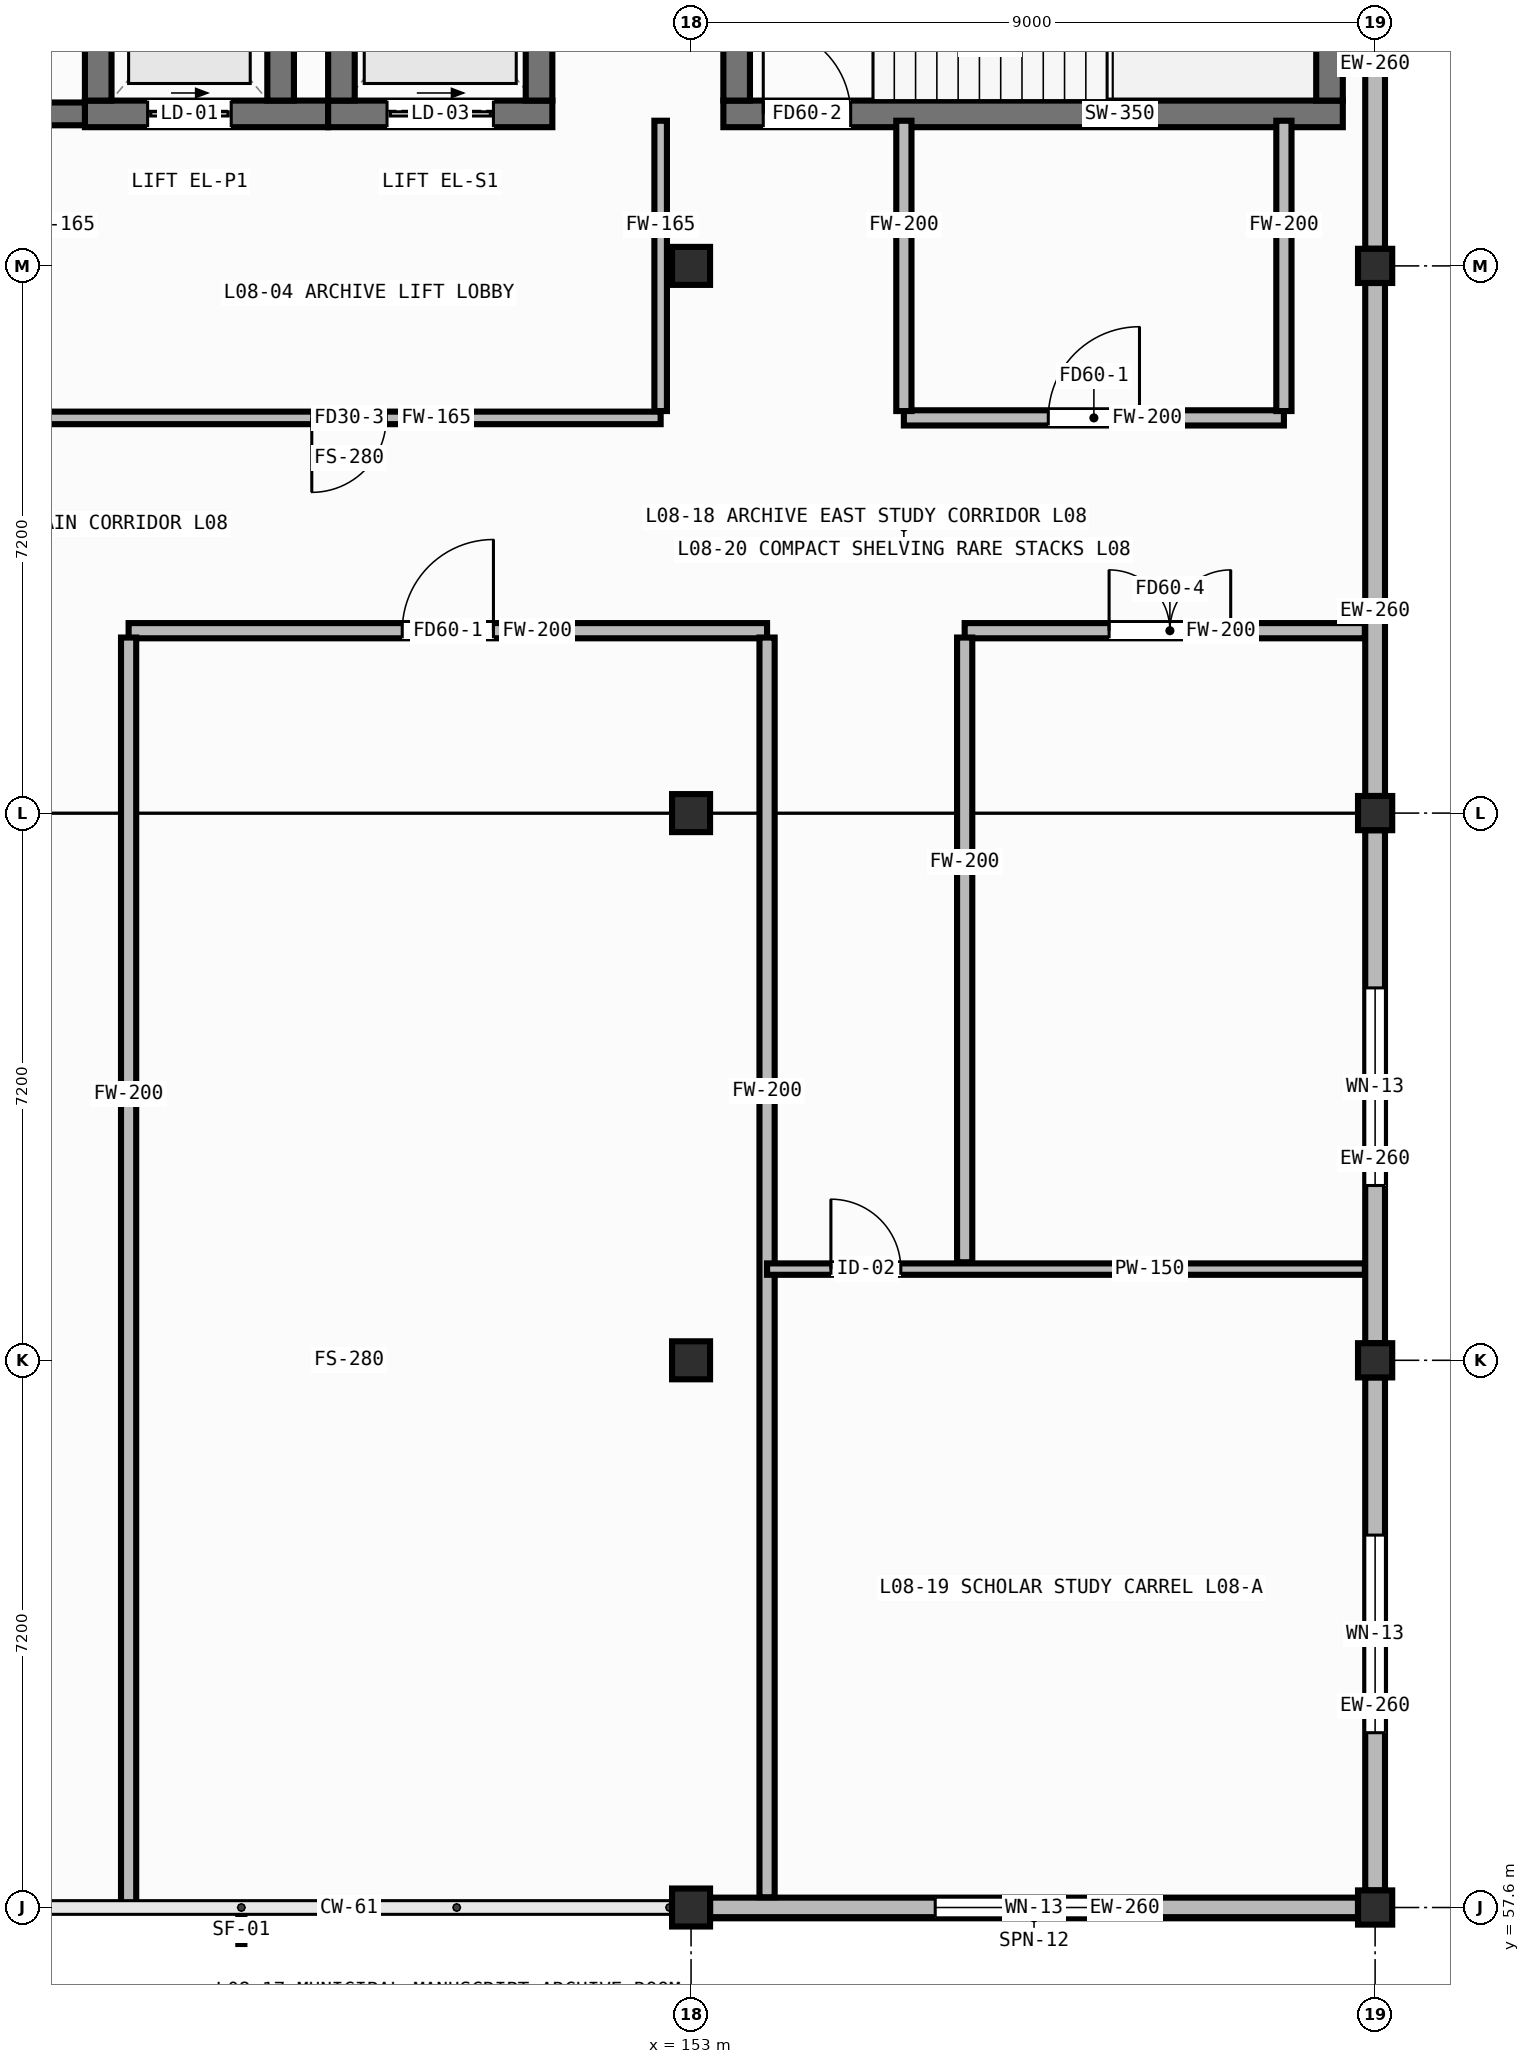
"""IFC4 building model, lengths in metres.
Left out: names, types, materials, properties, quantities, classifications, styles, units other than length and angle.
Written with IfcOpenShell. Run it as: python <this file> out.ifc"""

import sys

from ifc_helpers import new_model, si_unit, direction, frame, frame_2d, origin, origin_2d, place, context, subcontext, project, spatial, rectangle, hollow_rectangle, extrude, element, fill, save


model = new_model("IFC4")
c1 = context("Model", 3, precision=1e-05, world=origin(), true_north=direction((0.0, 1.0)))
c2 = subcontext(c1, "Body", "Model", "MODEL_VIEW")
j1 = project(units=[si_unit("LENGTHUNIT", "METRE"), si_unit("PLANEANGLEUNIT", "RADIAN")], contexts=[c1])
p1 = place(None, origin())
s1 = spatial("IfcSite", under=j1, at=p1, CompositionType="ELEMENT")
p2 = place(p1, origin())
s2 = spatial("IfcBuilding", under=s1, at=p2, CompositionType="ELEMENT")
p3 = place(p2, frame((0.0, 0.0, 27.8)))
s3 = spatial("IfcBuildingStorey", under=s2, at=p3, CompositionType="ELEMENT", Elevation=27.8)
for number, where, z_axis, x_axis in (
    (1, (153.0, 57.6, 0.0), (0.0, 0.0, 1.0), (1.0, 0.0, 0.0)),
    (2, (153.0, 64.8, 0.0), (0.0, 0.0, 1.0), (1.0, 0.0, 0.0)),
    (3, (153.0, 72.0, 0.0), (0.0, 0.0, 1.0), (1.0, 0.0, 0.0)),
    (4, (153.0, 79.2, 0.0), (0.0, 0.0, 1.0), (1.0, 0.0, 0.0)),
):
    element("IfcColumn", number, at=place(p3, frame(where, z_axis=z_axis, x_axis=x_axis)), inside=s3, PredefinedType="COLUMN", context=c2, shape_type="SweptSolid", body=[
        extrude(hollow_rectangle(XDim=0.5, YDim=0.5, WallThickness=0.022, at=origin_2d()), origin(), (0.0, 0.0, 1.0), 3.6),
    ])
for number, where, z_axis, x_axis in (
    (5, (162.0, 57.6, 0.0), (0.0, 0.0, 1.0), (1.0, 0.0, 0.0)),
    (6, (162.0, 64.8, 0.0), (0.0, 0.0, 1.0), (1.0, 0.0, 0.0)),
    (7, (162.0, 72.0, 0.0), (0.0, 0.0, 1.0), (1.0, 0.0, 0.0)),
    (8, (162.0, 79.2, 0.0), (0.0, 0.0, 1.0), (1.0, 0.0, 0.0)),
):
    element("IfcColumn", number, at=place(p3, frame(where, z_axis=z_axis, x_axis=x_axis)), inside=s3, PredefinedType="COLUMN", context=c2, shape_type="SweptSolid", body=[
        extrude(hollow_rectangle(XDim=0.45, YDim=0.45, WallThickness=0.019, at=origin_2d()), origin(), (0.0, 0.0, 1.0), 3.6),
    ])
p4 = place(p3, frame((153.25, 57.6, 0.0), z_axis=(0.0, 0.0, 1.0), x_axis=(1.0, 0.0, 0.0)))
e9 = element("IfcWall", 9, at=p4, inside=s3, PredefinedType="STANDARD", context=c2, shape_type="SweptSolid", body=[
    extrude(rectangle(XDim=8.525, YDim=0.26, at=frame_2d((4.262, 0.0))), origin(), (0.0, 0.0, 1.0), 2.915),
])
p5 = place(p4, frame((2.962, 0.0, 0.85)))
e10 = element("IfcOpeningElement", 10, at=p5, cuts=e9, PredefinedType="OPENING", context=c2, shape_type="SweptSolid", body=[
    extrude(rectangle(XDim=2.6, YDim=1.6, at=frame_2d((1.3, 0.8))), frame((0.0, 0.142, 0.0), z_axis=(0.0, -1.0, 0.0), x_axis=(1.0, 0.0, 0.0)), (0.0, 0.0, 1.0), 0.284),
])
p6 = place(p3, frame((162.0, 64.575, 0.0), z_axis=(0.0, 0.0, 1.0), x_axis=(0.0, -1.0, 0.0)))
e11 = element("IfcWall", 11, at=p6, inside=s3, PredefinedType="STANDARD", context=c2, shape_type="SweptSolid", body=[
    extrude(rectangle(XDim=6.75, YDim=0.26, at=frame_2d((3.375, 0.0))), origin(), (0.0, 0.0, 1.0), 2.915),
])
p7 = place(p6, frame((2.075, 0.0, 0.85)))
e12 = element("IfcOpeningElement", 12, at=p7, cuts=e11, PredefinedType="OPENING", context=c2, shape_type="SweptSolid", body=[
    extrude(rectangle(XDim=2.6, YDim=1.6, at=frame_2d((1.3, 0.8))), frame((0.0, 0.142, 0.0), z_axis=(0.0, -1.0, 0.0), x_axis=(1.0, 0.0, 0.0)), (0.0, 0.0, 1.0), 0.284),
])
p8 = place(p3, frame((162.0, 71.775, 0.0), z_axis=(0.0, 0.0, 1.0), x_axis=(0.0, -1.0, 0.0)))
e13 = element("IfcWall", 13, at=p8, inside=s3, PredefinedType="STANDARD", context=c2, shape_type="SweptSolid", body=[
    extrude(rectangle(XDim=6.75, YDim=0.26, at=frame_2d((3.375, 0.0))), origin(), (0.0, 0.0, 1.0), 2.915),
])
p9 = place(p8, frame((2.075, 0.0, 0.85)))
e14 = element("IfcOpeningElement", 14, at=p9, cuts=e13, PredefinedType="OPENING", context=c2, shape_type="SweptSolid", body=[
    extrude(rectangle(XDim=2.6, YDim=1.6, at=frame_2d((1.3, 0.8))), frame((0.0, 0.142, 0.0), z_axis=(0.0, -1.0, 0.0), x_axis=(1.0, 0.0, 0.0)), (0.0, 0.0, 1.0), 0.284),
])
for number, where, z_axis, x_axis in (
    (15, (162.0, 78.975, 0.0), (0.0, 0.0, 1.0), (0.0, -1.0, 0.0)),
    (16, (162.0, 86.175, 0.0), (0.0, 0.0, 1.0), (0.0, -1.0, 0.0)),
):
    element("IfcWall", number, at=place(p3, frame(where, z_axis=z_axis, x_axis=x_axis)), inside=s3, PredefinedType="STANDARD", context=c2, shape_type="SweptSolid", body=[
        extrude(rectangle(XDim=6.75, YDim=0.26, at=frame_2d((3.375, 0.0))), origin(), (0.0, 0.0, 1.0), 2.915),
    ])
p10 = place(p3, frame((153.425, 81.2, 0.0), z_axis=(0.0, 0.0, 1.0), x_axis=(1.0, 0.0, 0.0)))
e17 = element("IfcWall", 17, at=p10, inside=s3, PredefinedType="SHEAR", context=c2, shape_type="SweptSolid", body=[
    extrude(rectangle(XDim=8.15, YDim=0.35, at=frame_2d((4.075, 0.0))), origin(), (0.0, 0.0, 1.0), 3.315),
])
p11 = place(p10, frame((0.525, 0.0, 0.0)))
e18 = element("IfcOpeningElement", 18, at=p11, cuts=e17, PredefinedType="OPENING", context=c2, shape_type="SweptSolid", body=[
    extrude(rectangle(XDim=1.15, YDim=2.1, at=frame_2d((0.575, 1.05))), frame((0.0, 0.187, 0.0), z_axis=(0.0, -1.0, 0.0), x_axis=(1.0, 0.0, 0.0)), (0.0, 0.0, 1.0), 0.374),
])
for number, where, z_axis, x_axis in (
    (19, (153.6, 81.375, 0.0), (0.0, 0.0, 1.0), (0.0, 1.0, 0.0)),
    (20, (161.4, 81.375, 0.0), (0.0, 0.0, 1.0), (0.0, 1.0, 0.0)),
):
    element("IfcWall", number, at=place(p3, frame(where, z_axis=z_axis, x_axis=x_axis)), inside=s3, PredefinedType="SHEAR", context=c2, shape_type="SweptSolid", body=[
        extrude(rectangle(XDim=3.55, YDim=0.35, at=frame_2d((1.775, 0.0))), origin(), (0.0, 0.0, 1.0), 3.315),
    ])
p12 = place(p3, frame((145.025, 81.2, 0.0), z_axis=(0.0, 0.0, 1.0), x_axis=(1.0, 0.0, 0.0)))
e21 = element("IfcWall", 21, at=p12, inside=s3, PredefinedType="SHEAR", context=c2, shape_type="SweptSolid", body=[
    extrude(rectangle(XDim=3.2, YDim=0.35, at=frame_2d((1.6, 0.0))), origin(), (0.0, 0.0, 1.0), 3.315),
])
p13 = place(p12, frame((0.825, 0.0, 0.0)))
e22 = element("IfcOpeningElement", 22, at=p13, cuts=e21, PredefinedType="OPENING", context=c2, shape_type="SweptSolid", body=[
    extrude(rectangle(XDim=1.1, YDim=2.1, at=frame_2d((0.55, 1.05))), frame((0.0, 0.187, 0.0), z_axis=(0.0, -1.0, 0.0), x_axis=(1.0, 0.0, 0.0)), (0.0, 0.0, 1.0), 0.374),
])
for number, where, z_axis, x_axis in (
    (23, (145.2, 81.375, 0.0), (0.0, 0.0, 1.0), (0.0, 1.0, 0.0)),
    (24, (147.6, 81.375, 0.0), (0.0, 0.0, 1.0), (0.0, 1.0, 0.0)),
):
    element("IfcWall", number, at=place(p3, frame(where, z_axis=z_axis, x_axis=x_axis)), inside=s3, PredefinedType="SHEAR", context=c2, shape_type="SweptSolid", body=[
        extrude(rectangle(XDim=2.45, YDim=0.35, at=frame_2d((1.225, 0.0))), origin(), (0.0, 0.0, 1.0), 3.315),
    ])
p14 = place(p3, frame((148.225, 81.2, 0.0), z_axis=(0.0, 0.0, 1.0), x_axis=(1.0, 0.0, 0.0)))
e25 = element("IfcWall", 25, at=p14, inside=s3, PredefinedType="SHEAR", context=c2, shape_type="SweptSolid", body=[
    extrude(rectangle(XDim=2.95, YDim=0.35, at=frame_2d((1.475, 0.0))), origin(), (0.0, 0.0, 1.0), 3.315),
])
p15 = place(p14, frame((0.775, 0.0, 0.0)))
e26 = element("IfcOpeningElement", 26, at=p15, cuts=e25, PredefinedType="OPENING", context=c2, shape_type="SweptSolid", body=[
    extrude(rectangle(XDim=1.4, YDim=2.15, at=frame_2d((0.7, 1.075))), frame((0.0, 0.187, 0.0), z_axis=(0.0, -1.0, 0.0), x_axis=(1.0, 0.0, 0.0)), (0.0, 0.0, 1.0), 0.374),
])
for number, where, z_axis, x_axis in (
    (27, (148.4, 81.375, 0.0), (0.0, 0.0, 1.0), (0.0, 1.0, 0.0)),
    (28, (151.0, 81.375, 0.0), (0.0, 0.0, 1.0), (0.0, 1.0, 0.0)),
):
    element("IfcWall", number, at=place(p3, frame(where, z_axis=z_axis, x_axis=x_axis)), inside=s3, PredefinedType="SHEAR", context=c2, shape_type="SweptSolid", body=[
        extrude(rectangle(XDim=3.05, YDim=0.35, at=frame_2d((1.525, 0.0))), origin(), (0.0, 0.0, 1.0), 3.315),
    ])
p16 = place(p3, frame((141.775, 81.2, 0.0), z_axis=(0.0, 0.0, 1.0), x_axis=(1.0, 0.0, 0.0)))
e29 = element("IfcWall", 29, at=p16, inside=s3, PredefinedType="SHEAR", context=c2, shape_type="SweptSolid", body=[
    extrude(rectangle(XDim=3.25, YDim=0.3, at=frame_2d((1.625, 0.0))), origin(), (0.0, 0.0, 1.0), 3.315),
])
p17 = place(p3, frame((155.8, 77.2, 0.0), z_axis=(0.0, 0.0, 1.0), x_axis=(1.0, 0.0, 0.0)))
e30 = element("IfcWall", 30, at=p17, inside=s3, PredefinedType="PARTITIONING", context=c2, shape_type="SweptSolid", body=[
    extrude(rectangle(XDim=5.0, YDim=0.2, at=frame_2d((2.5, 0.0))), origin(), (0.0, 0.0, 1.0), 3.315),
])
p18 = place(p17, frame((1.9, 0.0, 0.0)))
e31 = element("IfcOpeningElement", 31, at=p18, cuts=e30, PredefinedType="OPENING", context=c2, shape_type="SweptSolid", body=[
    extrude(rectangle(XDim=1.2, YDim=2.1, at=frame_2d((0.6, 1.05))), frame((0.0, 0.112, 0.0), z_axis=(0.0, -1.0, 0.0), x_axis=(1.0, 0.0, 0.0)), (0.0, 0.0, 1.0), 0.224),
])
for number, where, z_axis, x_axis in (
    (32, (155.8, 77.29, 0.0), (0.0, 0.0, 1.0), (0.0, 1.0, 0.0)),
    (33, (160.8, 77.29, 0.0), (0.0, 0.0, 1.0), (0.0, 1.0, 0.0)),
):
    element("IfcWall", number, at=place(p3, frame(where, z_axis=z_axis, x_axis=x_axis)), inside=s3, PredefinedType="PARTITIONING", context=c2, shape_type="SweptSolid", body=[
        extrude(rectangle(XDim=3.82, YDim=0.2, at=frame_2d((1.91, 0.0))), origin(), (0.0, 0.0, 1.0), 3.315),
    ])
p19 = place(p3, frame((144.4, 77.2, 0.0), z_axis=(0.0, 0.0, 1.0), x_axis=(1.0, 0.0, 0.0)))
e34 = element("IfcWall", 34, at=p19, inside=s3, PredefinedType="PARTITIONING", context=c2, shape_type="SweptSolid", body=[
    extrude(rectangle(XDim=8.2, YDim=0.165, at=frame_2d((4.1, 0.0))), origin(), (0.0, 0.0, 1.0), 3.315),
])
p20 = place(p19, frame((3.61, 0.0, 0.0)))
e35 = element("IfcOpeningElement", 35, at=p20, cuts=e34, PredefinedType="OPENING", context=c2, shape_type="SweptSolid", body=[
    extrude(rectangle(XDim=0.98, YDim=2.02, at=frame_2d((0.49, 1.01))), frame((0.0, 0.094, 0.0), z_axis=(0.0, -1.0, 0.0), x_axis=(1.0, 0.0, 0.0)), (0.0, 0.0, 1.0), 0.189),
])
p21 = place(p3, frame((152.6, 77.29, 0.0), z_axis=(0.0, 0.0, 1.0), x_axis=(0.0, 1.0, 0.0)))
e36 = element("IfcWall", 36, at=p21, inside=s3, PredefinedType="PARTITIONING", context=c2, shape_type="SweptSolid", body=[
    extrude(rectangle(XDim=3.82, YDim=0.165, at=frame_2d((1.91, 0.0))), origin(), (0.0, 0.0, 1.0), 3.315),
])
p22 = place(p3, frame((145.6, 74.4, 0.0), z_axis=(0.0, 0.0, 1.0), x_axis=(1.0, 0.0, 0.0)))
e37 = element("IfcWall", 37, at=p22, inside=s3, PredefinedType="PARTITIONING", context=c2, shape_type="SweptSolid", body=[
    extrude(rectangle(XDim=8.4, YDim=0.2, at=frame_2d((4.2, 0.0))), origin(), (0.0, 0.0, 1.0), 3.315),
])
p23 = place(p22, frame((3.6, 0.0, 0.0)))
e38 = element("IfcOpeningElement", 38, at=p23, cuts=e37, PredefinedType="OPENING", context=c2, shape_type="SweptSolid", body=[
    extrude(rectangle(XDim=1.2, YDim=2.1, at=frame_2d((0.6, 1.05))), frame((0.0, 0.112, 0.0), z_axis=(0.0, -1.0, 0.0), x_axis=(1.0, 0.0, 0.0)), (0.0, 0.0, 1.0), 0.224),
])
p24 = place(p3, frame((145.6, 57.635, 0.0), z_axis=(0.0, 0.0, 1.0), x_axis=(0.0, 1.0, 0.0)))
e39 = element("IfcWall", 39, at=p24, inside=s3, PredefinedType="PARTITIONING", context=c2, shape_type="SweptSolid", body=[
    extrude(rectangle(XDim=16.675, YDim=0.2, at=frame_2d((8.337, 0.0))), origin(), (0.0, 0.0, 1.0), 3.315),
])
p25 = place(p3, frame((154.0, 57.735, 0.0), z_axis=(0.0, 0.0, 1.0), x_axis=(0.0, 1.0, 0.0)))
e40 = element("IfcWall", 40, at=p25, inside=s3, PredefinedType="PARTITIONING", context=c2, shape_type="SweptSolid", body=[
    extrude(rectangle(XDim=16.575, YDim=0.2, at=frame_2d((8.288, 0.0))), origin(), (0.0, 0.0, 1.0), 3.315),
])
p26 = place(p3, frame((154.0, 66.0, 0.0), z_axis=(0.0, 0.0, 1.0), x_axis=(1.0, 0.0, 0.0)))
e41 = element("IfcWall", 41, at=p26, inside=s3, PredefinedType="PARTITIONING", context=c2, shape_type="SweptSolid", body=[
    extrude(rectangle(XDim=7.865, YDim=0.15, at=frame_2d((3.933, 0.0))), origin(), (0.0, 0.0, 1.0), 3.315),
])
p27 = place(p26, frame((0.84, 0.0, 0.0)))
e42 = element("IfcOpeningElement", 42, at=p27, cuts=e41, PredefinedType="OPENING", context=c2, shape_type="SweptSolid", body=[
    extrude(rectangle(XDim=0.92, YDim=2.06, at=frame_2d((0.46, 1.03))), frame((0.0, 0.087, 0.0), z_axis=(0.0, -1.0, 0.0), x_axis=(1.0, 0.0, 0.0)), (0.0, 0.0, 1.0), 0.174),
])
p28 = place(p3, frame((156.6, 74.4, 0.0), z_axis=(0.0, 0.0, 1.0), x_axis=(1.0, 0.0, 0.0)))
e43 = element("IfcWall", 43, at=p28, inside=s3, PredefinedType="PARTITIONING", context=c2, shape_type="SweptSolid", body=[
    extrude(rectangle(XDim=5.265, YDim=0.2, at=frame_2d((2.632, 0.0))), origin(), (0.0, 0.0, 1.0), 3.315),
])
p29 = place(p28, frame((1.9, 0.0, 0.0)))
e44 = element("IfcOpeningElement", 44, at=p29, cuts=e43, PredefinedType="OPENING", context=c2, shape_type="SweptSolid", body=[
    extrude(rectangle(XDim=1.6, YDim=2.12, at=frame_2d((0.8, 1.06))), frame((0.0, 0.112, 0.0), z_axis=(0.0, -1.0, 0.0), x_axis=(1.0, 0.0, 0.0)), (0.0, 0.0, 1.0), 0.224),
])
p30 = place(p3, frame((156.6, 66.09, 0.0), z_axis=(0.0, 0.0, 1.0), x_axis=(0.0, 1.0, 0.0)))
e45 = element("IfcWall", 45, at=p30, inside=s3, PredefinedType="PARTITIONING", context=c2, shape_type="SweptSolid", body=[
    extrude(rectangle(XDim=8.22, YDim=0.2, at=frame_2d((4.11, 0.0))), origin(), (0.0, 0.0, 1.0), 3.315),
])
p31 = place(p5, origin())
e46 = element("IfcWindow", 46, at=p31, inside=s3, PartitioningType="DOUBLE_PANEL_VERTICAL", PredefinedType="WINDOW", context=c2, shape_type="SweptSolid", body=[
    extrude(rectangle(XDim=2.6, YDim=1.6, at=frame_2d((1.3, 0.8))), frame((0.0, 0.03, 0.0), z_axis=(0.0, -1.0, 0.0), x_axis=(1.0, 0.0, 0.0)), (0.0, 0.0, 1.0), 0.06),
])
fill(e10, e46)
p32 = place(p7, origin())
e47 = element("IfcWindow", 47, at=p32, inside=s3, PartitioningType="DOUBLE_PANEL_VERTICAL", PredefinedType="WINDOW", context=c2, shape_type="SweptSolid", body=[
    extrude(rectangle(XDim=2.6, YDim=1.6, at=frame_2d((1.3, 0.8))), frame((0.0, 0.03, 0.0), z_axis=(0.0, -1.0, 0.0), x_axis=(1.0, 0.0, 0.0)), (0.0, 0.0, 1.0), 0.06),
])
fill(e12, e47)
p33 = place(p9, origin())
e48 = element("IfcWindow", 48, at=p33, inside=s3, PartitioningType="DOUBLE_PANEL_VERTICAL", PredefinedType="WINDOW", context=c2, shape_type="SweptSolid", body=[
    extrude(rectangle(XDim=2.6, YDim=1.6, at=frame_2d((1.3, 0.8))), frame((0.0, 0.03, 0.0), z_axis=(0.0, -1.0, 0.0), x_axis=(1.0, 0.0, 0.0)), (0.0, 0.0, 1.0), 0.06),
])
fill(e14, e48)
p34 = place(p11, origin())
e49 = element("IfcDoor", 49, at=p34, inside=s3, OperationType="SINGLE_SWING_LEFT", PredefinedType="DOOR", context=c2, shape_type="SweptSolid", body=[
    extrude(rectangle(XDim=1.15, YDim=2.1, at=frame_2d((0.575, 1.05))), frame((0.0, 0.025, 0.0), z_axis=(0.0, -1.0, 0.0), x_axis=(1.0, 0.0, 0.0)), (0.0, 0.0, 1.0), 0.05),
])
fill(e18, e49)
p35 = place(p13, origin())
e50 = element("IfcDoor", 50, at=p35, inside=s3, OperationType="SLIDING_TO_LEFT", PredefinedType="DOOR", context=c2, shape_type="SweptSolid", body=[
    extrude(rectangle(XDim=1.1, YDim=2.1, at=frame_2d((0.55, 1.05))), frame((0.0, 0.025, 0.0), z_axis=(0.0, -1.0, 0.0), x_axis=(1.0, 0.0, 0.0)), (0.0, 0.0, 1.0), 0.05),
])
fill(e22, e50)
p36 = place(p15, origin())
e51 = element("IfcDoor", 51, at=p36, inside=s3, OperationType="SLIDING_TO_LEFT", PredefinedType="DOOR", context=c2, shape_type="SweptSolid", body=[
    extrude(rectangle(XDim=1.4, YDim=2.15, at=frame_2d((0.7, 1.075))), frame((0.0, 0.025, 0.0), z_axis=(0.0, -1.0, 0.0), x_axis=(1.0, 0.0, 0.0)), (0.0, 0.0, 1.0), 0.05),
])
fill(e26, e51)
p37 = place(p18, origin())
e52 = element("IfcDoor", 52, at=p37, inside=s3, OperationType="SINGLE_SWING_RIGHT", PredefinedType="DOOR", context=c2, shape_type="SweptSolid", body=[
    extrude(rectangle(XDim=1.2, YDim=2.1, at=frame_2d((0.6, 1.05))), frame((0.0, 0.025, 0.0), z_axis=(0.0, -1.0, 0.0), x_axis=(1.0, 0.0, 0.0)), (0.0, 0.0, 1.0), 0.05),
])
fill(e31, e52)
p38 = place(p20, frame((0.98, 0.0, 0.0), z_axis=(0.0, 0.0, 1.0), x_axis=(-1.0, 0.0, 0.0)))
e53 = element("IfcDoor", 53, at=p38, inside=s3, OperationType="SINGLE_SWING_RIGHT", PredefinedType="DOOR", context=c2, shape_type="SweptSolid", body=[
    extrude(rectangle(XDim=0.98, YDim=2.02, at=frame_2d((0.49, 1.01))), frame((0.0, 0.025, 0.0), z_axis=(0.0, -1.0, 0.0), x_axis=(1.0, 0.0, 0.0)), (0.0, 0.0, 1.0), 0.05),
])
fill(e35, e53)
p39 = place(p23, origin())
e54 = element("IfcDoor", 54, at=p39, inside=s3, OperationType="SINGLE_SWING_RIGHT", PredefinedType="DOOR", context=c2, shape_type="SweptSolid", body=[
    extrude(rectangle(XDim=1.2, YDim=2.1, at=frame_2d((0.6, 1.05))), frame((0.0, 0.025, 0.0), z_axis=(0.0, -1.0, 0.0), x_axis=(1.0, 0.0, 0.0)), (0.0, 0.0, 1.0), 0.05),
])
fill(e38, e54)
p40 = place(p27, origin())
e55 = element("IfcDoor", 55, at=p40, inside=s3, OperationType="SINGLE_SWING_LEFT", PredefinedType="DOOR", context=c2, shape_type="SweptSolid", body=[
    extrude(rectangle(XDim=0.92, YDim=2.06, at=frame_2d((0.46, 1.03))), frame((0.0, 0.025, 0.0), z_axis=(0.0, -1.0, 0.0), x_axis=(1.0, 0.0, 0.0)), (0.0, 0.0, 1.0), 0.05),
])
fill(e42, e55)
p41 = place(p29, origin())
e56 = element("IfcDoor", 56, at=p41, inside=s3, OperationType="DOUBLE_DOOR_SINGLE_SWING", PredefinedType="DOOR", context=c2, shape_type="SweptSolid", body=[
    extrude(rectangle(XDim=1.6, YDim=2.12, at=frame_2d((0.8, 1.06))), frame((0.0, 0.025, 0.0), z_axis=(0.0, -1.0, 0.0), x_axis=(1.0, 0.0, 0.0)), (0.0, 0.0, 1.0), 0.05),
])
fill(e44, e56)
save(model, sys.argv[1])
